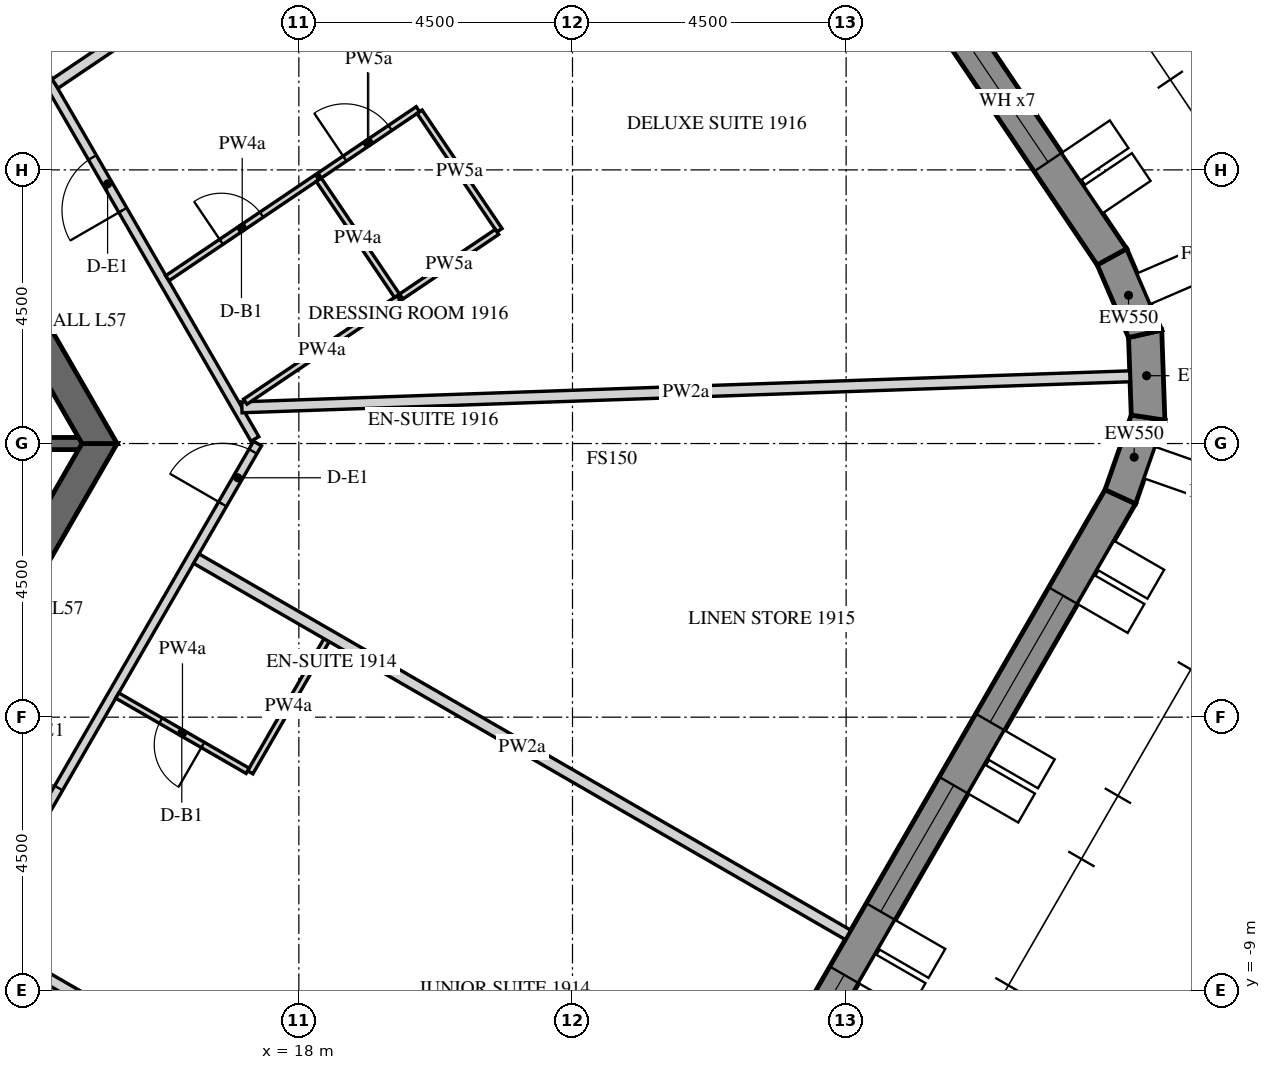
"""IFC4 building model, lengths in metres.
Left out: names, types, materials, properties, quantities, classifications, styles, units other than length and angle.
Written with IfcOpenShell. Run it as: python <this file> out.ifc"""

import sys

from ifc_helpers import new_model, si_unit, direction, frame, frame_2d, origin, place, context, subcontext, project, spatial, polyline, rectangle, outline, extrude, element, fill, save


model = new_model("IFC4")
c1 = context("Model", 3, precision=1e-05, world=origin(), true_north=direction((0.0, 1.0)))
c2 = subcontext(c1, "Body", "Model", "MODEL_VIEW")
j1 = project(units=[si_unit("LENGTHUNIT", "METRE"), si_unit("PLANEANGLEUNIT", "RADIAN")], contexts=[c1])
p1 = place(None, origin())
s1 = spatial("IfcSite", under=j1, at=p1, CompositionType="ELEMENT")
p2 = place(p1, origin())
s2 = spatial("IfcBuilding", under=s1, at=p2, CompositionType="ELEMENT")
p3 = place(p2, frame((0.0, 0.0, 238.5)))
s3 = spatial("IfcBuildingStorey", under=s2, at=p3, CompositionType="ELEMENT", Elevation=238.5)
p4 = place(p3, frame((17.63, -24.914, -0.15), z_axis=(0.0, 0.0, 1.0), x_axis=(0.499998569178, 0.866026229868, 0.0)))
e1 = element("IfcWall", 1, at=p4, inside=s3, PredefinedType="SOLIDWALL", context=c2, shape_type="SweptSolid", body=[
    extrude(outline(polyline([(-0.022, -0.275), (27.783, -0.275), (27.732, 0.275), (0.022, 0.275), (-0.022, -0.275)])), origin(), (0.0, 0.0, 1.0), 3.9),
])
p5 = place(p4, frame((1.879, 0.0, 1.05)))
e2 = element("IfcOpeningElement", 2, at=p5, cuts=e1, PredefinedType="OPENING", context=c2, shape_type="SweptSolid", body=[
    extrude(rectangle(XDim=2.4, YDim=2.4, at=frame_2d((1.2, 1.2))), frame((0.0, 0.285, 0.0), z_axis=(0.0, -1.0, 0.0), x_axis=(1.0, 0.0, 0.0)), (0.0, 0.0, 1.0), 0.57),
])
p6 = place(p4, frame((5.479, 0.0, 1.05)))
e3 = element("IfcOpeningElement", 3, at=p6, cuts=e1, PredefinedType="OPENING", context=c2, shape_type="SweptSolid", body=[
    extrude(rectangle(XDim=2.4, YDim=2.4, at=frame_2d((1.2, 1.2))), frame((0.0, 0.285, 0.0), z_axis=(0.0, -1.0, 0.0), x_axis=(1.0, 0.0, 0.0)), (0.0, 0.0, 1.0), 0.57),
])
p7 = place(p4, frame((9.079, 0.0, 1.05)))
e4 = element("IfcOpeningElement", 4, at=p7, cuts=e1, PredefinedType="OPENING", context=c2, shape_type="SweptSolid", body=[
    extrude(rectangle(XDim=2.4, YDim=2.4, at=frame_2d((1.2, 1.2))), frame((0.0, 0.285, 0.0), z_axis=(0.0, -1.0, 0.0), x_axis=(1.0, 0.0, 0.0)), (0.0, 0.0, 1.0), 0.57),
])
p8 = place(p4, frame((12.679, 0.0, 1.05)))
e5 = element("IfcOpeningElement", 5, at=p8, cuts=e1, PredefinedType="OPENING", context=c2, shape_type="SweptSolid", body=[
    extrude(rectangle(XDim=2.4, YDim=2.4, at=frame_2d((1.2, 1.2))), frame((0.0, 0.285, 0.0), z_axis=(0.0, -1.0, 0.0), x_axis=(1.0, 0.0, 0.0)), (0.0, 0.0, 1.0), 0.57),
])
p9 = place(p4, frame((16.279, 0.0, 1.05)))
e6 = element("IfcOpeningElement", 6, at=p9, cuts=e1, PredefinedType="OPENING", context=c2, shape_type="SweptSolid", body=[
    extrude(rectangle(XDim=2.4, YDim=2.4, at=frame_2d((1.2, 1.2))), frame((0.0, 0.285, 0.0), z_axis=(0.0, -1.0, 0.0), x_axis=(1.0, 0.0, 0.0)), (0.0, 0.0, 1.0), 0.57),
])
p10 = place(p4, frame((19.879, 0.0, 1.05)))
e7 = element("IfcOpeningElement", 7, at=p10, cuts=e1, PredefinedType="OPENING", context=c2, shape_type="SweptSolid", body=[
    extrude(rectangle(XDim=2.4, YDim=2.4, at=frame_2d((1.2, 1.2))), frame((0.0, 0.285, 0.0), z_axis=(0.0, -1.0, 0.0), x_axis=(1.0, 0.0, 0.0)), (0.0, 0.0, 1.0), 0.57),
])
p11 = place(p4, frame((23.479, 0.0, 1.05)))
e8 = element("IfcOpeningElement", 8, at=p11, cuts=e1, PredefinedType="OPENING", context=c2, shape_type="SweptSolid", body=[
    extrude(rectangle(XDim=2.4, YDim=2.4, at=frame_2d((1.2, 1.2))), frame((0.0, 0.285, 0.0), z_axis=(0.0, -1.0, 0.0), x_axis=(1.0, 0.0, 0.0)), (0.0, 0.0, 1.0), 0.57),
])
p12 = place(p3, frame((31.509, -0.875, -0.15), z_axis=(0.0, 0.0, 1.0), x_axis=(0.33111537203, 0.943590276765, 0.0)))
e9 = element("IfcWall", 9, at=p12, inside=s3, PredefinedType="SOLIDWALL", context=c2, shape_type="SweptSolid", body=[
    extrude(outline(polyline([(-0.026, -0.275), (1.431, -0.275), (1.327, 0.275), (0.026, 0.275), (-0.026, -0.275)])), origin(), (0.0, 0.0, 1.0), 3.9),
])
p13 = place(p3, frame((31.966, 0.426, -0.15), z_axis=(0.0, 0.0, 1.0), x_axis=(-0.034876908462, 0.999391615562, 0.0)))
e10 = element("IfcWall", 10, at=p13, inside=s3, PredefinedType="SOLIDWALL", context=c2, shape_type="SweptSolid", body=[
    extrude(outline(polyline([(-0.052, -0.275), (1.431, -0.275), (1.327, 0.275), (0.052, 0.275), (-0.052, -0.275)])), origin(), (0.0, 0.0, 1.0), 3.9),
])
p14 = place(p3, frame((31.917, 1.804, -0.15), z_axis=(0.0, 0.0, 1.0), x_axis=(-0.396225741392, 0.918153125496, 0.0)))
e11 = element("IfcWall", 11, at=p14, inside=s3, PredefinedType="SOLIDWALL", context=c2, shape_type="SweptSolid", body=[
    extrude(outline(polyline([(-0.052, -0.275), (1.405, -0.275), (1.353, 0.275), (0.052, 0.275), (-0.052, -0.275)])), origin(), (0.0, 0.0, 1.0), 3.9),
])
p15 = place(p3, frame((31.371, 3.071, -0.15), z_axis=(0.0, 0.0, 1.0), x_axis=(-0.559189891278, 0.829039604297, 0.0)))
e12 = element("IfcWall", 12, at=p15, inside=s3, PredefinedType="SOLIDWALL", context=c2, shape_type="SweptSolid", body=[
    extrude(outline(polyline([(-0.026, -0.275), (27.781, -0.275), (27.736, 0.275), (0.026, 0.275), (-0.026, -0.275)])), origin(), (0.0, 0.0, 1.0), 3.9),
])
p16 = place(p15, frame((1.879, 0.0, 1.05)))
e13 = element("IfcOpeningElement", 13, at=p16, cuts=e12, PredefinedType="OPENING", context=c2, shape_type="SweptSolid", body=[
    extrude(rectangle(XDim=2.4, YDim=2.4, at=frame_2d((1.2, 1.2))), frame((0.0, 0.285, 0.0), z_axis=(0.0, -1.0, 0.0), x_axis=(1.0, 0.0, 0.0)), (0.0, 0.0, 1.0), 0.57),
])
p17 = place(p15, frame((5.479, 0.0, 1.05)))
e14 = element("IfcOpeningElement", 14, at=p17, cuts=e12, PredefinedType="OPENING", context=c2, shape_type="SweptSolid", body=[
    extrude(rectangle(XDim=2.4, YDim=2.4, at=frame_2d((1.2, 1.2))), frame((0.0, 0.285, 0.0), z_axis=(0.0, -1.0, 0.0), x_axis=(1.0, 0.0, 0.0)), (0.0, 0.0, 1.0), 0.57),
])
p18 = place(p15, frame((9.079, 0.0, 1.05)))
e15 = element("IfcOpeningElement", 15, at=p18, cuts=e12, PredefinedType="OPENING", context=c2, shape_type="SweptSolid", body=[
    extrude(rectangle(XDim=2.4, YDim=2.4, at=frame_2d((1.2, 1.2))), frame((0.0, 0.285, 0.0), z_axis=(0.0, -1.0, 0.0), x_axis=(1.0, 0.0, 0.0)), (0.0, 0.0, 1.0), 0.57),
])
p19 = place(p15, frame((12.679, 0.0, 1.05)))
e16 = element("IfcOpeningElement", 16, at=p19, cuts=e12, PredefinedType="OPENING", context=c2, shape_type="SweptSolid", body=[
    extrude(rectangle(XDim=2.4, YDim=2.4, at=frame_2d((1.2, 1.2))), frame((0.0, 0.285, 0.0), z_axis=(0.0, -1.0, 0.0), x_axis=(1.0, 0.0, 0.0)), (0.0, 0.0, 1.0), 0.57),
])
p20 = place(p15, frame((16.279, 0.0, 1.05)))
e17 = element("IfcOpeningElement", 17, at=p20, cuts=e12, PredefinedType="OPENING", context=c2, shape_type="SweptSolid", body=[
    extrude(rectangle(XDim=2.4, YDim=2.4, at=frame_2d((1.2, 1.2))), frame((0.0, 0.285, 0.0), z_axis=(0.0, -1.0, 0.0), x_axis=(1.0, 0.0, 0.0)), (0.0, 0.0, 1.0), 0.57),
])
p21 = place(p15, frame((19.879, 0.0, 1.05)))
e18 = element("IfcOpeningElement", 18, at=p21, cuts=e12, PredefinedType="OPENING", context=c2, shape_type="SweptSolid", body=[
    extrude(rectangle(XDim=2.4, YDim=2.4, at=frame_2d((1.2, 1.2))), frame((0.0, 0.285, 0.0), z_axis=(0.0, -1.0, 0.0), x_axis=(1.0, 0.0, 0.0)), (0.0, 0.0, 1.0), 0.57),
])
p22 = place(p15, frame((23.479, 0.0, 1.05)))
e19 = element("IfcOpeningElement", 19, at=p22, cuts=e12, PredefinedType="OPENING", context=c2, shape_type="SweptSolid", body=[
    extrude(rectangle(XDim=2.4, YDim=2.4, at=frame_2d((1.2, 1.2))), frame((0.0, 0.285, 0.0), z_axis=(0.0, -1.0, 0.0), x_axis=(1.0, 0.0, 0.0)), (0.0, 0.0, 1.0), 0.57),
])
p23 = place(p3, frame((7.361, -12.75, -0.15), z_axis=(0.0, 0.0, 1.0), x_axis=(0.50000571537, 0.866022103989, 0.0)))
e20 = element("IfcWall", 20, at=p23, inside=s3, PredefinedType="SHEAR", context=c2, shape_type="SweptSolid", body=[
    extrude(outline(polyline([(-0.144, -0.25), (14.867, -0.25), (14.578, 0.25), (0.144, 0.25), (-0.144, -0.25)])), origin(), (0.0, 0.0, 1.0), 3.9),
])
p24 = place(p23, frame((6.49, 0.0, 0.15)))
e21 = element("IfcOpeningElement", 21, at=p24, cuts=e20, PredefinedType="OPENING", context=c2, shape_type="SweptSolid", body=[
    extrude(rectangle(XDim=1.8, YDim=2.4, at=frame_2d((0.9, 1.2))), frame((0.0, 0.26, 0.0), z_axis=(0.0, -1.0, 0.0), x_axis=(1.0, 0.0, 0.0)), (0.0, 0.0, 1.0), 0.52),
])
p25 = place(p3, frame((14.722, 0.0, -0.15), z_axis=(0.0, 0.0, 1.0), x_axis=(-0.50000571537, 0.866022103989, 0.0)))
e22 = element("IfcWall", 22, at=p25, inside=s3, PredefinedType="SHEAR", context=c2, shape_type="SweptSolid", body=[
    extrude(outline(polyline([(-0.144, -0.25), (14.867, -0.25), (14.578, 0.25), (0.144, 0.25), (-0.144, -0.25)])), origin(), (0.0, 0.0, 1.0), 3.9),
])
p26 = place(p25, frame((6.432, 0.0, 0.15)))
e23 = element("IfcOpeningElement", 23, at=p26, cuts=e22, PredefinedType="OPENING", context=c2, shape_type="SweptSolid", body=[
    extrude(rectangle(XDim=1.8, YDim=2.4, at=frame_2d((0.9, 1.2))), frame((0.0, 0.26, 0.0), z_axis=(0.0, -1.0, 0.0), x_axis=(1.0, 0.0, 0.0)), (0.0, 0.0, 1.0), 0.52),
])
p27 = place(p3, frame((11.547, 0.0, -0.15), z_axis=(0.0, 0.0, 1.0), x_axis=(1.0, 0.0, 0.0)))
e24 = element("IfcWall", 24, at=p27, inside=s3, PredefinedType="SHEAR", context=c2, shape_type="SweptSolid", body=[
    extrude(rectangle(XDim=2.887, YDim=0.2, at=frame_2d((1.443, 0.0))), origin(), (0.0, 0.0, 1.0), 3.9),
])
p28 = place(p3, frame((9.887, -12.875, 0.0), z_axis=(0.0, 0.0, 1.0), x_axis=(0.499998228944, 0.866026426302, 0.0)))
e25 = element("IfcWall", 25, at=p28, inside=s3, PredefinedType="PARTITIONING", context=c2, shape_type="SweptSolid", body=[
    extrude(rectangle(XDim=14.867, YDim=0.15, at=frame_2d((7.433, 0.0))), origin(), (0.0, 0.0, 1.0), 2.838),
])
p29 = place(p28, frame((3.519, 0.0, 0.0)))
e26 = element("IfcOpeningElement", 26, at=p29, cuts=e25, PredefinedType="OPENING", context=c2, shape_type="SweptSolid", body=[
    extrude(rectangle(XDim=1.0, YDim=2.1, at=frame_2d((0.5, 1.05))), frame((0.0, 0.085, 0.0), z_axis=(0.0, -1.0, 0.0), x_axis=(1.0, 0.0, 0.0)), (0.0, 0.0, 1.0), 0.17),
])
p30 = place(p28, frame((7.324, 0.0, 0.0)))
e27 = element("IfcOpeningElement", 27, at=p30, cuts=e25, PredefinedType="OPENING", context=c2, shape_type="SweptSolid", body=[
    extrude(rectangle(XDim=1.0, YDim=2.1, at=frame_2d((0.5, 1.05))), frame((0.0, 0.085, 0.0), z_axis=(0.0, -1.0, 0.0), x_axis=(1.0, 0.0, 0.0)), (0.0, 0.0, 1.0), 0.17),
])
p31 = place(p28, frame((13.717, 0.0, 0.0)))
e28 = element("IfcOpeningElement", 28, at=p31, cuts=e25, PredefinedType="OPENING", context=c2, shape_type="SweptSolid", body=[
    extrude(rectangle(XDim=1.0, YDim=2.1, at=frame_2d((0.5, 1.05))), frame((0.0, 0.085, 0.0), z_axis=(0.0, -1.0, 0.0), x_axis=(1.0, 0.0, 0.0)), (0.0, 0.0, 1.0), 0.17),
])
p32 = place(p3, frame((17.277, 0.075, 0.0), z_axis=(0.0, 0.0, 1.0), x_axis=(-0.499998228944, 0.866026426302, 0.0)))
e29 = element("IfcWall", 29, at=p32, inside=s3, PredefinedType="PARTITIONING", context=c2, shape_type="SweptSolid", body=[
    extrude(rectangle(XDim=14.867, YDim=0.15, at=frame_2d((7.433, 0.0))), origin(), (0.0, 0.0, 1.0), 2.838),
])
p33 = place(p32, frame((4.345, 0.0, 0.0)))
e30 = element("IfcOpeningElement", 30, at=p33, cuts=e29, PredefinedType="OPENING", context=c2, shape_type="SweptSolid", body=[
    extrude(rectangle(XDim=1.0, YDim=2.1, at=frame_2d((0.5, 1.05))), frame((0.0, 0.085, 0.0), z_axis=(0.0, -1.0, 0.0), x_axis=(1.0, 0.0, 0.0)), (0.0, 0.0, 1.0), 0.17),
])
p34 = place(p32, frame((8.51, 0.0, 0.0)))
e31 = element("IfcOpeningElement", 31, at=p34, cuts=e29, PredefinedType="OPENING", context=c2, shape_type="SweptSolid", body=[
    extrude(rectangle(XDim=1.0, YDim=2.1, at=frame_2d((0.5, 1.05))), frame((0.0, 0.085, 0.0), z_axis=(0.0, -1.0, 0.0), x_axis=(1.0, 0.0, 0.0)), (0.0, 0.0, 1.0), 0.17),
])
p35 = place(p3, frame((23.431, -14.316, 0.0), z_axis=(0.0, 0.0, 1.0), x_axis=(-0.866024931941, 0.500000817256, 0.0)))
e32 = element("IfcWall", 32, at=p35, inside=s3, PredefinedType="PARTITIONING", context=c2, shape_type="SweptSolid", body=[
    extrude(rectangle(XDim=12.375, YDim=0.18, at=frame_2d((6.188, 0.0))), origin(), (0.0, 0.0, 1.0), 2.838),
])
p36 = place(p3, frame((18.456, -3.233, 0.0), z_axis=(0.0, 0.0, 1.0), x_axis=(-0.500062048339, -0.865989577195, 0.0)))
e33 = element("IfcWall", 33, at=p36, inside=s3, PredefinedType="PARTITIONING", context=c2, shape_type="SweptSolid", body=[
    extrude(rectangle(XDim=2.51, YDim=0.1, at=frame_2d((1.255, 0.0))), origin(), (0.0, 0.0, 1.0), 2.838),
])
p37 = place(p3, frame((17.158, -5.382, 0.0), z_axis=(0.0, 0.0, 1.0), x_axis=(-0.866031185235, 0.4999899861, 0.0)))
e34 = element("IfcWall", 34, at=p37, inside=s3, PredefinedType="PARTITIONING", context=c2, shape_type="SweptSolid", body=[
    extrude(rectangle(XDim=2.475, YDim=0.1, at=frame_2d((1.238, 0.0))), origin(), (0.0, 0.0, 1.0), 2.838),
])
p38 = place(p37, frame((0.85, 0.0, 0.0)))
e35 = element("IfcOpeningElement", 35, at=p38, cuts=e34, PredefinedType="OPENING", context=c2, shape_type="SweptSolid", body=[
    extrude(rectangle(XDim=0.8, YDim=2.1, at=frame_2d((0.4, 1.05))), frame((0.0, 0.06, 0.0), z_axis=(0.0, -1.0, 0.0), x_axis=(1.0, 0.0, 0.0)), (0.0, 0.0, 1.0), 0.12),
])
p39 = place(p3, frame((27.031, -8.08, 0.0), z_axis=(0.0, 0.0, 1.0), x_axis=(-0.866024931941, 0.500000817256, 0.0)))
e36 = element("IfcWall", 36, at=p39, inside=s3, PredefinedType="PARTITIONING", context=c2, shape_type="SweptSolid", body=[
    extrude(rectangle(XDim=12.375, YDim=0.18, at=frame_2d((6.188, 0.0))), origin(), (0.0, 0.0, 1.0), 2.838),
])
p40 = place(p3, frame((31.667, 1.106, 0.0), z_axis=(0.0, 0.0, 1.0), x_axis=(-0.999391305206, -0.034885800543, 0.0)))
e37 = element("IfcWall", 37, at=p40, inside=s3, PredefinedType="PARTITIONING", context=c2, shape_type="SweptSolid", body=[
    extrude(rectangle(XDim=14.612, YDim=0.18, at=frame_2d((7.306, 0.0))), origin(), (0.0, 0.0, 1.0), 2.838),
])
p41 = place(p3, frame((15.838, 2.719, 0.0), z_axis=(0.0, 0.0, 1.0), x_axis=(0.829027811096, 0.559207375156, 0.0)))
e38 = element("IfcWall", 38, at=p41, inside=s3, PredefinedType="PARTITIONING", context=c2, shape_type="SweptSolid", body=[
    extrude(rectangle(XDim=2.97, YDim=0.1, at=frame_2d((1.485, 0.0))), origin(), (0.0, 0.0, 1.0), 2.838),
])
p42 = place(p41, frame((1.07, 0.0, 0.0)))
e39 = element("IfcOpeningElement", 39, at=p42, cuts=e38, PredefinedType="OPENING", context=c2, shape_type="SweptSolid", body=[
    extrude(rectangle(XDim=0.8, YDim=2.1, at=frame_2d((0.4, 1.05))), frame((0.0, 0.06, 0.0), z_axis=(0.0, -1.0, 0.0), x_axis=(1.0, 0.0, 0.0)), (0.0, 0.0, 1.0), 0.12),
])
p43 = place(p3, frame((19.642, 2.389, 0.0), z_axis=(0.0, 0.0, 1.0), x_axis=(-0.82902628405, -0.559209639004, 0.0)))
e40 = element("IfcWall", 40, at=p43, inside=s3, PredefinedType="PARTITIONING", context=c2, shape_type="SweptSolid", body=[
    extrude(rectangle(XDim=3.043, YDim=0.1, at=frame_2d((1.521, 0.0))), origin(), (0.0, 0.0, 1.0), 2.838),
])
p44 = place(p3, frame((18.341, 4.407, 0.0), z_axis=(0.0, 0.0, 1.0), x_axis=(0.829014089772, 0.559227716552, 0.0)))
e41 = element("IfcWall", 41, at=p44, inside=s3, PredefinedType="PARTITIONING", context=c2, shape_type="SweptSolid", body=[
    extrude(rectangle(XDim=1.95, YDim=0.1, at=frame_2d((0.975, 0.0))), origin(), (0.0, 0.0, 1.0), 2.838),
])
p45 = place(p44, frame((0.5, 0.0, 0.0)))
e42 = element("IfcOpeningElement", 42, at=p45, cuts=e41, PredefinedType="OPENING", context=c2, shape_type="SweptSolid", body=[
    extrude(rectangle(XDim=0.9, YDim=2.1, at=frame_2d((0.45, 1.05))), frame((0.0, 0.06, 0.0), z_axis=(0.0, -1.0, 0.0), x_axis=(1.0, 0.0, 0.0)), (0.0, 0.0, 1.0), 0.12),
])
p46 = place(p3, frame((19.986, 5.456, 0.0), z_axis=(0.0, 0.0, 1.0), x_axis=(0.559223037199, -0.829017246302, 0.0)))
e43 = element("IfcWall", 43, at=p46, inside=s3, PredefinedType="PARTITIONING", context=c2, shape_type="SweptSolid", body=[
    extrude(rectangle(XDim=2.35, YDim=0.1, at=frame_2d((1.175, 0.0))), origin(), (0.0, 0.0, 1.0), 2.838),
])
p47 = place(p3, frame((21.258, 3.48, 0.0), z_axis=(0.0, 0.0, 1.0), x_axis=(-0.82903334026, -0.559199178055, 0.0)))
e44 = element("IfcWall", 44, at=p47, inside=s3, PredefinedType="PARTITIONING", context=c2, shape_type="SweptSolid", body=[
    extrude(rectangle(XDim=1.9, YDim=0.1, at=frame_2d((0.95, 0.0))), origin(), (0.0, 0.0, 1.0), 2.838),
])
p48 = place(p3, frame((24.389, 12.931, 0.0), z_axis=(0.0, 0.0, 1.0), x_axis=(-0.829040439793, -0.559188652593, 0.0)))
e45 = element("IfcWall", 45, at=p48, inside=s3, PredefinedType="PARTITIONING", context=c2, shape_type="SweptSolid", body=[
    extrude(rectangle(XDim=12.542, YDim=0.18, at=frame_2d((6.271, 0.0))), origin(), (0.0, 0.0, 1.0), 2.838),
])
p49 = place(p3, frame((19.614, 2.431, 0.0), z_axis=(0.0, 0.0, 1.0), x_axis=(-0.559199358977, 0.829033218225, 0.0)))
e46 = element("IfcWall", 46, at=p49, inside=s3, PredefinedType="PARTITIONING", context=c2, shape_type="SweptSolid", body=[
    extrude(rectangle(XDim=2.3, YDim=0.1, at=frame_2d((1.15, 0.0))), origin(), (0.0, 0.0, 1.0), 2.838),
])
p50 = place(p9, frame((0.0, 0.205, 0.0)))
e47 = element("IfcWindow", 47, at=p50, inside=s3, PartitioningType="DOUBLE_PANEL_VERTICAL", PredefinedType="WINDOW", context=c2, shape_type="SweptSolid", body=[
    extrude(rectangle(XDim=2.4, YDim=2.4, at=frame_2d((1.2, 1.2))), frame((0.0, 0.03, 0.0), z_axis=(0.0, -1.0, 0.0), x_axis=(1.0, 0.0, 0.0)), (0.0, 0.0, 1.0), 0.06),
])
fill(e6, e47)
p51 = place(p10, frame((0.0, 0.205, 0.0)))
e48 = element("IfcWindow", 48, at=p51, inside=s3, PartitioningType="DOUBLE_PANEL_VERTICAL", PredefinedType="WINDOW", context=c2, shape_type="SweptSolid", body=[
    extrude(rectangle(XDim=2.4, YDim=2.4, at=frame_2d((1.2, 1.2))), frame((0.0, 0.03, 0.0), z_axis=(0.0, -1.0, 0.0), x_axis=(1.0, 0.0, 0.0)), (0.0, 0.0, 1.0), 0.06),
])
fill(e7, e48)
p52 = place(p11, frame((0.0, 0.205, 0.0)))
e49 = element("IfcWindow", 49, at=p52, inside=s3, PartitioningType="DOUBLE_PANEL_VERTICAL", PredefinedType="WINDOW", context=c2, shape_type="SweptSolid", body=[
    extrude(rectangle(XDim=2.4, YDim=2.4, at=frame_2d((1.2, 1.2))), frame((0.0, 0.03, 0.0), z_axis=(0.0, -1.0, 0.0), x_axis=(1.0, 0.0, 0.0)), (0.0, 0.0, 1.0), 0.06),
])
fill(e8, e49)
p53 = place(p16, frame((0.0, 0.205, 0.0)))
e50 = element("IfcWindow", 50, at=p53, inside=s3, PartitioningType="DOUBLE_PANEL_VERTICAL", PredefinedType="WINDOW", context=c2, shape_type="SweptSolid", body=[
    extrude(rectangle(XDim=2.4, YDim=2.4, at=frame_2d((1.2, 1.2))), frame((0.0, 0.03, 0.0), z_axis=(0.0, -1.0, 0.0), x_axis=(1.0, 0.0, 0.0)), (0.0, 0.0, 1.0), 0.06),
])
fill(e13, e50)
p54 = place(p30, origin())
e51 = element("IfcDoor", 51, at=p54, inside=s3, OperationType="SINGLE_SWING_LEFT", PredefinedType="DOOR", context=c2, shape_type="SweptSolid", body=[
    extrude(rectangle(XDim=1.0, YDim=2.1, at=frame_2d((0.5, 1.05))), frame((0.0, 0.025, 0.0), z_axis=(0.0, -1.0, 0.0), x_axis=(1.0, 0.0, 0.0)), (0.0, 0.0, 1.0), 0.05),
])
fill(e27, e51)
p55 = place(p38, origin())
e52 = element("IfcDoor", 52, at=p55, inside=s3, OperationType="SINGLE_SWING_LEFT", PredefinedType="DOOR", context=c2, shape_type="SweptSolid", body=[
    extrude(rectangle(XDim=0.8, YDim=2.1, at=frame_2d((0.4, 1.05))), frame((0.0, 0.025, 0.0), z_axis=(0.0, -1.0, 0.0), x_axis=(1.0, 0.0, 0.0)), (0.0, 0.0, 1.0), 0.05),
])
fill(e35, e52)
p56 = place(p31, origin())
e53 = element("IfcDoor", 53, at=p56, inside=s3, OperationType="SINGLE_SWING_LEFT", PredefinedType="DOOR", context=c2, shape_type="SweptSolid", body=[
    extrude(rectangle(XDim=1.0, YDim=2.1, at=frame_2d((0.5, 1.05))), frame((0.0, 0.025, 0.0), z_axis=(0.0, -1.0, 0.0), x_axis=(1.0, 0.0, 0.0)), (0.0, 0.0, 1.0), 0.05),
])
fill(e28, e53)
p57 = place(p33, origin())
e54 = element("IfcDoor", 54, at=p57, inside=s3, OperationType="SINGLE_SWING_LEFT", PredefinedType="DOOR", context=c2, shape_type="SweptSolid", body=[
    extrude(rectangle(XDim=1.0, YDim=2.1, at=frame_2d((0.5, 1.05))), frame((0.0, 0.025, 0.0), z_axis=(0.0, -1.0, 0.0), x_axis=(1.0, 0.0, 0.0)), (0.0, 0.0, 1.0), 0.05),
])
fill(e30, e54)
p58 = place(p42, origin())
e55 = element("IfcDoor", 55, at=p58, inside=s3, OperationType="SINGLE_SWING_RIGHT", PredefinedType="DOOR", context=c2, shape_type="SweptSolid", body=[
    extrude(rectangle(XDim=0.8, YDim=2.1, at=frame_2d((0.4, 1.05))), frame((0.0, 0.025, 0.0), z_axis=(0.0, -1.0, 0.0), x_axis=(1.0, 0.0, 0.0)), (0.0, 0.0, 1.0), 0.05),
])
fill(e39, e55)
p59 = place(p45, origin())
e56 = element("IfcDoor", 56, at=p59, inside=s3, OperationType="SINGLE_SWING_RIGHT", PredefinedType="DOOR", context=c2, shape_type="SweptSolid", body=[
    extrude(rectangle(XDim=0.9, YDim=2.1, at=frame_2d((0.45, 1.05))), frame((0.0, 0.025, 0.0), z_axis=(0.0, -1.0, 0.0), x_axis=(1.0, 0.0, 0.0)), (0.0, 0.0, 1.0), 0.05),
])
fill(e42, e56)
save(model, sys.argv[1])
